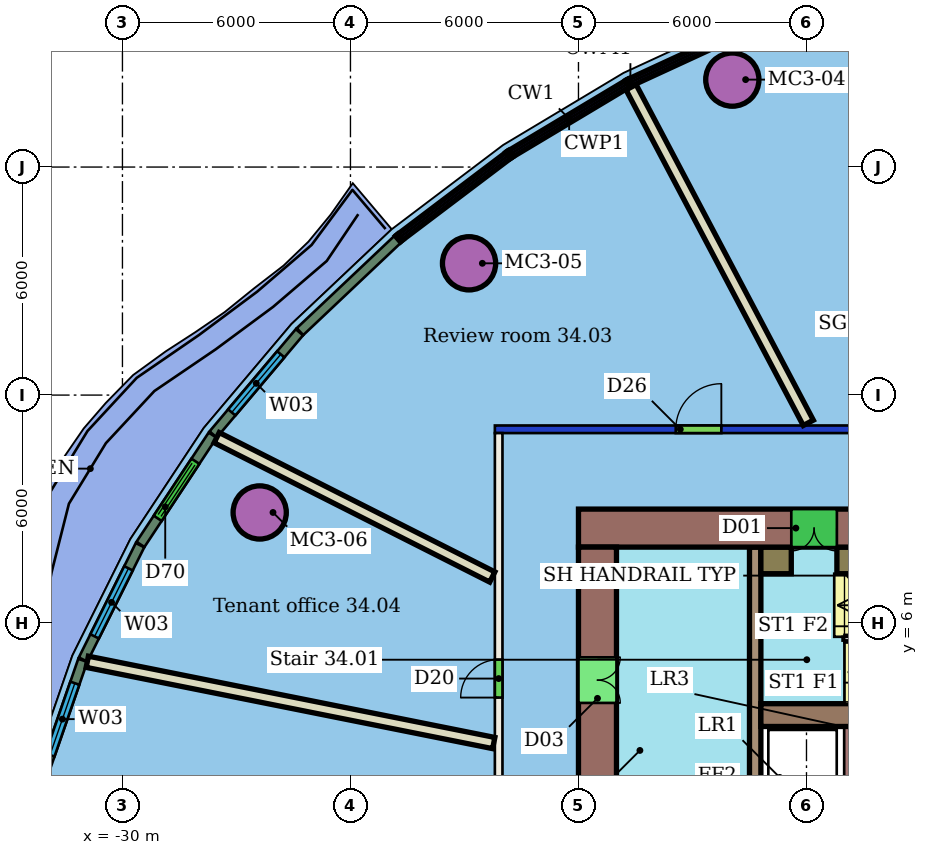
"""IFC4 building model, lengths in metres.
Left out: names, types, materials, properties, quantities, classifications, styles, units other than length and angle.
Written with IfcOpenShell. Run it as: python <this file> out.ifc"""

import sys

from ifc_helpers import new_model, si_unit, direction, frame, frame_2d, origin, origin_2d, place, context, subcontext, project, spatial, rectangle, hollow_circle, extrude, element, fill, save


model = new_model("IFC4")
c1 = context("Model", 3, precision=1e-05, world=origin(), true_north=direction((0.0, 1.0)))
c2 = subcontext(c1, "Body", "Model", "MODEL_VIEW")
j1 = project(units=[si_unit("LENGTHUNIT", "METRE"), si_unit("PLANEANGLEUNIT", "RADIAN")], contexts=[c1])
p1 = place(None, origin())
s1 = spatial("IfcSite", under=j1, at=p1, CompositionType="ELEMENT")
p2 = place(p1, origin())
s2 = spatial("IfcBuilding", under=s1, at=p2, CompositionType="ELEMENT")
p3 = place(p2, frame((0.0, 0.0, 147.0)))
s3 = spatial("IfcBuildingStorey", under=s2, at=p3, CompositionType="ELEMENT", Elevation=147.0)
for number, where, z_axis, x_axis in (
    (1, (-13.952, 20.301, 0.0), (0.0, 0.0, 1.0), (1.0, 0.0, 0.0)),
    (2, (-20.879, 15.467, 0.0), (0.0, 0.0, 1.0), (1.0, 0.0, 0.0)),
    (3, (-26.388, 8.912, 0.0), (0.0, 0.0, 1.0), (1.0, 0.0, 0.0)),
):
    element("IfcColumn", number, at=place(p3, frame(where, z_axis=z_axis, x_axis=x_axis)), inside=s3, PredefinedType="COLUMN", context=c2, shape_type="SweptSolid", body=[
        extrude(hollow_circle(Radius=0.7, WallThickness=0.05, at=origin_2d()), origin(), (0.0, 0.0, 1.0), 3.45),
    ])
p4 = place(p3, frame((-20.1, -11.0, 0.0), z_axis=(0.0, 0.0, 1.0), x_axis=(0.0, 1.0, 0.0)))
e4 = element("IfcWall", 4, at=p4, inside=s3, PredefinedType="PARTITIONING", context=c2, shape_type="SweptSolid", body=[
    extrude(rectangle(XDim=22.0, YDim=0.2, at=frame_2d((11.0, 0.0))), origin(), (0.0, 0.0, 1.0), 3.45),
])
p5 = place(p4, frame((15.041, 0.0, 0.0)))
e5 = element("IfcOpeningElement", 5, at=p5, cuts=e4, PredefinedType="OPENING", context=c2, shape_type="SweptSolid", body=[
    extrude(rectangle(XDim=1.0, YDim=2.1, at=frame_2d((0.5, 1.05))), frame((0.0, 0.11, 0.0), z_axis=(0.0, -1.0, 0.0), x_axis=(1.0, 0.0, 0.0)), (0.0, 0.0, 1.0), 0.22),
])
p6 = place(p4, frame((9.277, 0.0, 0.0)))
e6 = element("IfcOpeningElement", 6, at=p6, cuts=e4, PredefinedType="OPENING", context=c2, shape_type="SweptSolid", body=[
    extrude(rectangle(XDim=1.8, YDim=2.4, at=frame_2d((0.9, 1.2))), frame((0.0, 0.11, 0.0), z_axis=(0.0, -1.0, 0.0), x_axis=(1.0, 0.0, 0.0)), (0.0, 0.0, 1.0), 0.22),
])
p7 = place(p3, frame((-20.2, 11.1, 0.0), z_axis=(0.0, 0.0, 1.0), x_axis=(1.0, 0.0, 0.0)))
e7 = element("IfcWall", 7, at=p7, inside=s3, PredefinedType="PARTITIONING", context=c2, shape_type="SweptSolid", body=[
    extrude(rectangle(XDim=28.4, YDim=0.2, at=frame_2d((14.2, 0.0))), origin(), (0.0, 0.0, 1.0), 3.05),
])
p8 = place(p7, frame((20.499, 0.0, 0.0)))
e8 = element("IfcOpeningElement", 8, at=p8, cuts=e7, PredefinedType="OPENING", context=c2, shape_type="SweptSolid", body=[
    extrude(rectangle(XDim=1.1, YDim=2.1, at=frame_2d((0.55, 1.05))), frame((0.0, 0.11, 0.0), z_axis=(0.0, -1.0, 0.0), x_axis=(1.0, 0.0, 0.0)), (0.0, 0.0, 1.0), 0.22),
])
p9 = place(p7, frame((10.889, 0.0, 0.0)))
e9 = element("IfcOpeningElement", 9, at=p9, cuts=e7, PredefinedType="OPENING", context=c2, shape_type="SweptSolid", body=[
    extrude(rectangle(XDim=1.0, YDim=2.1, at=frame_2d((0.5, 1.05))), frame((0.0, 0.11, 0.0), z_axis=(0.0, -1.0, 0.0), x_axis=(1.0, 0.0, 0.0)), (0.0, 0.0, 1.0), 0.22),
])
p10 = place(p7, frame((4.76, 0.0, 0.0)))
e10 = element("IfcOpeningElement", 10, at=p10, cuts=e7, PredefinedType="OPENING", context=c2, shape_type="SweptSolid", body=[
    extrude(rectangle(XDim=1.2, YDim=2.1, at=frame_2d((0.6, 1.05))), frame((0.0, 0.11, 0.0), z_axis=(0.0, -1.0, 0.0), x_axis=(1.0, 0.0, 0.0)), (0.0, 0.0, 1.0), 0.22),
])
p11 = place(p3, frame((-16.616, 20.101, 0.0), z_axis=(0.0, 0.0, 1.0), x_axis=(0.467001313274, -0.884256621915, 0.0)))
e11 = element("IfcWall", 11, at=p11, inside=s3, PredefinedType="PARTITIONING", context=c2, shape_type="SweptSolid", body=[
    extrude(rectangle(XDim=9.987, YDim=0.3, at=frame_2d((4.994, 0.0))), origin(), (0.0, 0.0, 1.0), 3.45),
])
p12 = place(p3, frame((-27.52, 10.88, 0.0), z_axis=(0.0, 0.0, 1.0), x_axis=(0.89242962945, -0.451186609375, 0.0)))
e12 = element("IfcWall", 12, at=p12, inside=s3, PredefinedType="PARTITIONING", context=c2, shape_type="SweptSolid", body=[
    extrude(rectangle(XDim=8.127, YDim=0.3, at=frame_2d((4.063, 0.0))), origin(), (0.0, 0.0, 1.0), 3.45),
])
p13 = place(p3, frame((-30.925, 4.983, 0.0), z_axis=(0.0, 0.0, 1.0), x_axis=(0.980597889581, -0.196030046039, 0.0)))
e13 = element("IfcWall", 13, at=p13, inside=s3, PredefinedType="PARTITIONING", context=c2, shape_type="SweptSolid", body=[
    extrude(rectangle(XDim=10.907, YDim=0.3, at=frame_2d((5.454, 0.0))), origin(), (0.0, 0.0, 1.0), 3.45),
])
p14 = place(p3, frame((-22.76, 16.097, 0.0), z_axis=(0.0, 0.0, 1.0), x_axis=(-0.72679086529, -0.68685881965, 0.0)))
e14 = element("IfcWall", 14, at=p14, inside=s3, PredefinedType="SOLIDWALL", context=c2, shape_type="SweptSolid", body=[
    extrude(rectangle(XDim=3.534, YDim=0.25, at=frame_2d((1.767, 0.0))), origin(), (0.0, 0.0, 1.0), 3.1),
])
p15 = place(p3, frame((-25.344, 13.653, 0.0), z_axis=(0.0, 0.0, 1.0), x_axis=(-0.644846877048, -0.764311785308, 0.0)))
e15 = element("IfcWall", 15, at=p15, inside=s3, PredefinedType="SOLIDWALL", context=c2, shape_type="SweptSolid", body=[
    extrude(rectangle(XDim=3.519, YDim=0.25, at=frame_2d((1.76, 0.0))), origin(), (0.0, 0.0, 1.0), 3.1),
])
p16 = place(p15, frame((0.76, 0.0, 0.9)))
e16 = element("IfcOpeningElement", 16, at=p16, cuts=e15, PredefinedType="OPENING", context=c2, shape_type="SweptSolid", body=[
    extrude(rectangle(XDim=2.0, YDim=2.1, at=frame_2d((1.0, 1.05))), frame((0.0, 0.135, 0.0), z_axis=(0.0, -1.0, 0.0), x_axis=(1.0, 0.0, 0.0)), (0.0, 0.0, 1.0), 0.27),
])
p17 = place(p3, frame((-27.626, 10.946, 0.0), z_axis=(0.0, 0.0, 1.0), x_axis=(-0.551326854006, -0.834289338331, 0.0)))
e17 = element("IfcWall", 17, at=p17, inside=s3, PredefinedType="SOLIDWALL", context=c2, shape_type="SweptSolid", body=[
    extrude(rectangle(XDim=3.445, YDim=0.25, at=frame_2d((1.723, 0.0))), origin(), (0.0, 0.0, 1.0), 3.1),
])
p18 = place(p17, frame((0.823, 0.0, 0.0)))
e18 = element("IfcOpeningElement", 18, at=p18, cuts=e17, PredefinedType="OPENING", context=c2, shape_type="SweptSolid", body=[
    extrude(rectangle(XDim=1.8, YDim=2.4, at=frame_2d((0.9, 1.2))), frame((0.0, 0.135, 0.0), z_axis=(0.0, -1.0, 0.0), x_axis=(1.0, 0.0, 0.0)), (0.0, 0.0, 1.0), 0.27),
])
p19 = place(p3, frame((-29.538, 8.051, 0.0), z_axis=(0.0, 0.0, 1.0), x_axis=(-0.445527727944, -0.895268140633, 0.0)))
e19 = element("IfcWall", 19, at=p19, inside=s3, PredefinedType="SOLIDWALL", context=c2, shape_type="SweptSolid", body=[
    extrude(rectangle(XDim=3.361, YDim=0.25, at=frame_2d((1.681, 0.0))), origin(), (0.0, 0.0, 1.0), 3.1),
])
p20 = place(p19, frame((0.681, 0.0, 0.9)))
e20 = element("IfcOpeningElement", 20, at=p20, cuts=e19, PredefinedType="OPENING", context=c2, shape_type="SweptSolid", body=[
    extrude(rectangle(XDim=2.0, YDim=2.1, at=frame_2d((1.0, 1.05))), frame((0.0, 0.135, 0.0), z_axis=(0.0, -1.0, 0.0), x_axis=(1.0, 0.0, 0.0)), (0.0, 0.0, 1.0), 0.27),
])
p21 = place(p3, frame((-31.044, 5.02, 0.0), z_axis=(0.0, 0.0, 1.0), x_axis=(-0.327287400889, -0.944924842101, 0.0)))
e21 = element("IfcWall", 21, at=p21, inside=s3, PredefinedType="SOLIDWALL", context=c2, shape_type="SweptSolid", body=[
    extrude(rectangle(XDim=3.272, YDim=0.25, at=frame_2d((1.636, 0.0))), origin(), (0.0, 0.0, 1.0), 3.1),
])
p22 = place(p21, frame((0.636, 0.0, 0.9)))
e22 = element("IfcOpeningElement", 22, at=p22, cuts=e21, PredefinedType="OPENING", context=c2, shape_type="SweptSolid", body=[
    extrude(rectangle(XDim=2.0, YDim=2.1, at=frame_2d((1.0, 1.05))), frame((0.0, 0.135, 0.0), z_axis=(0.0, -1.0, 0.0), x_axis=(1.0, 0.0, 0.0)), (0.0, 0.0, 1.0), 0.27),
])
p23 = place(p3, frame((-6.0, 8.5, 0.0), z_axis=(0.0, 0.0, 1.0), x_axis=(-1.0, 0.0, 0.0)))
e23 = element("IfcWall", 23, at=p23, inside=s3, PredefinedType="SHEAR", context=c2, shape_type="SweptSolid", body=[
    extrude(rectangle(XDim=12.0, YDim=1.0, at=frame_2d((6.0, 0.0))), origin(), (0.0, 0.0, 1.0), 3.3),
])
p24 = place(p23, frame((5.2, 0.0, 0.0)))
e24 = element("IfcOpeningElement", 24, at=p24, cuts=e23, PredefinedType="OPENING", context=c2, shape_type="SweptSolid", body=[
    extrude(rectangle(XDim=1.2, YDim=2.1, at=frame_2d((0.6, 1.05))), frame((0.0, 0.51, 0.0), z_axis=(0.0, -1.0, 0.0), x_axis=(1.0, 0.0, 0.0)), (0.0, 0.0, 1.0), 1.02),
])
p25 = place(p3, frame((-17.5, 8.0, 0.0), z_axis=(0.0, 0.0, 1.0), x_axis=(0.0, -1.0, 0.0)))
e25 = element("IfcWall", 25, at=p25, inside=s3, PredefinedType="SHEAR", context=c2, shape_type="SweptSolid", body=[
    extrude(rectangle(XDim=16.0, YDim=1.0, at=frame_2d((8.0, 0.0))), origin(), (0.0, 0.0, 1.0), 3.3),
])
p26 = place(p25, frame((11.9, 0.0, 0.0)))
e26 = element("IfcOpeningElement", 26, at=p26, cuts=e25, PredefinedType="OPENING", context=c2, shape_type="SweptSolid", body=[
    extrude(rectangle(XDim=1.2, YDim=2.1, at=frame_2d((0.6, 1.05))), frame((0.0, 0.51, 0.0), z_axis=(0.0, -1.0, 0.0), x_axis=(1.0, 0.0, 0.0)), (0.0, 0.0, 1.0), 1.02),
])
p27 = place(p25, frame((2.9, 0.0, 0.0)))
e27 = element("IfcOpeningElement", 27, at=p27, cuts=e25, PredefinedType="OPENING", context=c2, shape_type="SweptSolid", body=[
    extrude(rectangle(XDim=1.2, YDim=2.1, at=frame_2d((0.6, 1.05))), frame((0.0, 0.51, 0.0), z_axis=(0.0, -1.0, 0.0), x_axis=(1.0, 0.0, 0.0)), (0.0, 0.0, 1.0), 1.02),
])
p28 = place(p3, frame((-13.2, 3.58, 0.0), z_axis=(0.0, 0.0, 1.0), x_axis=(1.0, 0.0, 0.0)))
e28 = element("IfcWall", 28, at=p28, inside=s3, PredefinedType="SHEAR", context=c2, shape_type="SweptSolid", body=[
    extrude(rectangle(XDim=7.2, YDim=0.6, at=frame_2d((3.6, 0.0))), origin(), (0.0, 0.0, 1.0), 3.3),
])
p29 = place(p3, frame((-13.35, 8.0, 0.0), z_axis=(0.0, 0.0, 1.0), x_axis=(0.0, -1.0, 0.0)))
e29 = element("IfcWall", 29, at=p29, inside=s3, PredefinedType="SHEAR", context=c2, shape_type="SweptSolid", body=[
    extrude(rectangle(XDim=16.0, YDim=0.3, at=frame_2d((8.0, 0.0))), origin(), (0.0, 0.0, 1.0), 3.3),
])
p30 = place(p29, frame((7.25, 0.0, 0.0)))
e30 = element("IfcOpeningElement", 30, at=p30, cuts=e29, PredefinedType="OPENING", context=c2, shape_type="SweptSolid", body=[
    extrude(rectangle(XDim=1.5, YDim=2.1, at=frame_2d((0.75, 1.05))), frame((0.0, 0.16, 0.0), z_axis=(0.0, -1.0, 0.0), x_axis=(1.0, 0.0, 0.0)), (0.0, 0.0, 1.0), 0.32),
])
p31 = place(p3, frame((-13.2, 7.65, 0.0), z_axis=(0.0, 0.0, 1.0), x_axis=(1.0, 0.0, 0.0)))
e31 = element("IfcWall", 31, at=p31, inside=s3, PredefinedType="SHEAR", context=c2, shape_type="SweptSolid", body=[
    extrude(rectangle(XDim=0.8, YDim=0.7, at=frame_2d((0.4, 0.0))), origin(), (0.0, 0.0, 1.0), 3.3),
])
p32 = place(p3, frame((-11.2, 7.65, 0.0), z_axis=(0.0, 0.0, 1.0), x_axis=(1.0, 0.0, 0.0)))
e32 = element("IfcWall", 32, at=p32, inside=s3, PredefinedType="SHEAR", context=c2, shape_type="SweptSolid", body=[
    extrude(rectangle(XDim=5.05, YDim=0.7, at=frame_2d((2.525, 0.0))), origin(), (0.0, 0.0, 1.0), 3.3),
])
p33 = place(p3, frame((-10.883, 1.6, 0.0), z_axis=(0.0, 0.0, 1.0), x_axis=(0.0, 1.0, 0.0)))
e33 = element("IfcWall", 33, at=p33, inside=s3, PredefinedType="SHEAR", context=c2, shape_type="SweptSolid", body=[
    extrude(rectangle(XDim=1.68, YDim=0.25, at=frame_2d((0.84, 0.0))), origin(), (0.0, 0.0, 1.0), 3.3),
])
p34 = place(p10, origin())
e34 = element("IfcDoor", 34, at=p34, inside=s3, OperationType="SINGLE_SWING_RIGHT", PredefinedType="DOOR", context=c2, shape_type="SweptSolid", body=[
    extrude(rectangle(XDim=1.2, YDim=2.1, at=frame_2d((0.6, 1.05))), frame((0.0, 0.025, 0.0), z_axis=(0.0, -1.0, 0.0), x_axis=(1.0, 0.0, 0.0)), (0.0, 0.0, 1.0), 0.05),
])
fill(e10, e34)
p35 = place(p5, origin())
e35 = element("IfcDoor", 35, at=p35, inside=s3, OperationType="SINGLE_SWING_LEFT", PredefinedType="DOOR", context=c2, shape_type="SweptSolid", body=[
    extrude(rectangle(XDim=1.0, YDim=2.1, at=frame_2d((0.5, 1.05))), frame((0.0, 0.025, 0.0), z_axis=(0.0, -1.0, 0.0), x_axis=(1.0, 0.0, 0.0)), (0.0, 0.0, 1.0), 0.05),
])
fill(e5, e35)
p36 = place(p16, origin())
e36 = element("IfcWindow", 36, at=p36, inside=s3, PartitioningType="SINGLE_PANEL", PredefinedType="WINDOW", context=c2, shape_type="SweptSolid", body=[
    extrude(rectangle(XDim=2.0, YDim=2.1, at=frame_2d((1.0, 1.05))), frame((0.0, 0.03, 0.0), z_axis=(0.0, -1.0, 0.0), x_axis=(1.0, 0.0, 0.0)), (0.0, 0.0, 1.0), 0.06),
])
fill(e16, e36)
p37 = place(p18, origin())
e37 = element("IfcDoor", 37, at=p37, inside=s3, OperationType="DOUBLE_DOOR_SLIDING", PredefinedType="DOOR", context=c2, shape_type="SweptSolid", body=[
    extrude(rectangle(XDim=1.8, YDim=2.4, at=frame_2d((0.9, 1.2))), frame((0.0, 0.025, 0.0), z_axis=(0.0, -1.0, 0.0), x_axis=(1.0, 0.0, 0.0)), (0.0, 0.0, 1.0), 0.05),
])
fill(e18, e37)
p38 = place(p20, origin())
e38 = element("IfcWindow", 38, at=p38, inside=s3, PartitioningType="SINGLE_PANEL", PredefinedType="WINDOW", context=c2, shape_type="SweptSolid", body=[
    extrude(rectangle(XDim=2.0, YDim=2.1, at=frame_2d((1.0, 1.05))), frame((0.0, 0.03, 0.0), z_axis=(0.0, -1.0, 0.0), x_axis=(1.0, 0.0, 0.0)), (0.0, 0.0, 1.0), 0.06),
])
fill(e20, e38)
p39 = place(p22, origin())
e39 = element("IfcWindow", 39, at=p39, inside=s3, PartitioningType="SINGLE_PANEL", PredefinedType="WINDOW", context=c2, shape_type="SweptSolid", body=[
    extrude(rectangle(XDim=2.0, YDim=2.1, at=frame_2d((1.0, 1.05))), frame((0.0, 0.03, 0.0), z_axis=(0.0, -1.0, 0.0), x_axis=(1.0, 0.0, 0.0)), (0.0, 0.0, 1.0), 0.06),
])
fill(e22, e39)
p40 = place(p24, origin())
e40 = element("IfcDoor", 40, at=p40, inside=s3, OperationType="DOUBLE_DOOR_SINGLE_SWING", PredefinedType="NOTDEFINED", context=c2, shape_type="SweptSolid", body=[
    extrude(rectangle(XDim=1.2, YDim=2.1, at=frame_2d((0.6, 1.05))), frame((0.0, 0.025, 0.0), z_axis=(0.0, -1.0, 0.0), x_axis=(1.0, 0.0, 0.0)), (0.0, 0.0, 1.0), 0.05),
])
fill(e24, e40)
p41 = place(p27, origin())
e41 = element("IfcDoor", 41, at=p41, inside=s3, OperationType="DOUBLE_DOOR_SINGLE_SWING", PredefinedType="NOTDEFINED", context=c2, shape_type="SweptSolid", body=[
    extrude(rectangle(XDim=1.2, YDim=2.1, at=frame_2d((0.6, 1.05))), frame((0.0, 0.025, 0.0), z_axis=(0.0, -1.0, 0.0), x_axis=(1.0, 0.0, 0.0)), (0.0, 0.0, 1.0), 0.05),
])
fill(e27, e41)
save(model, sys.argv[1])
